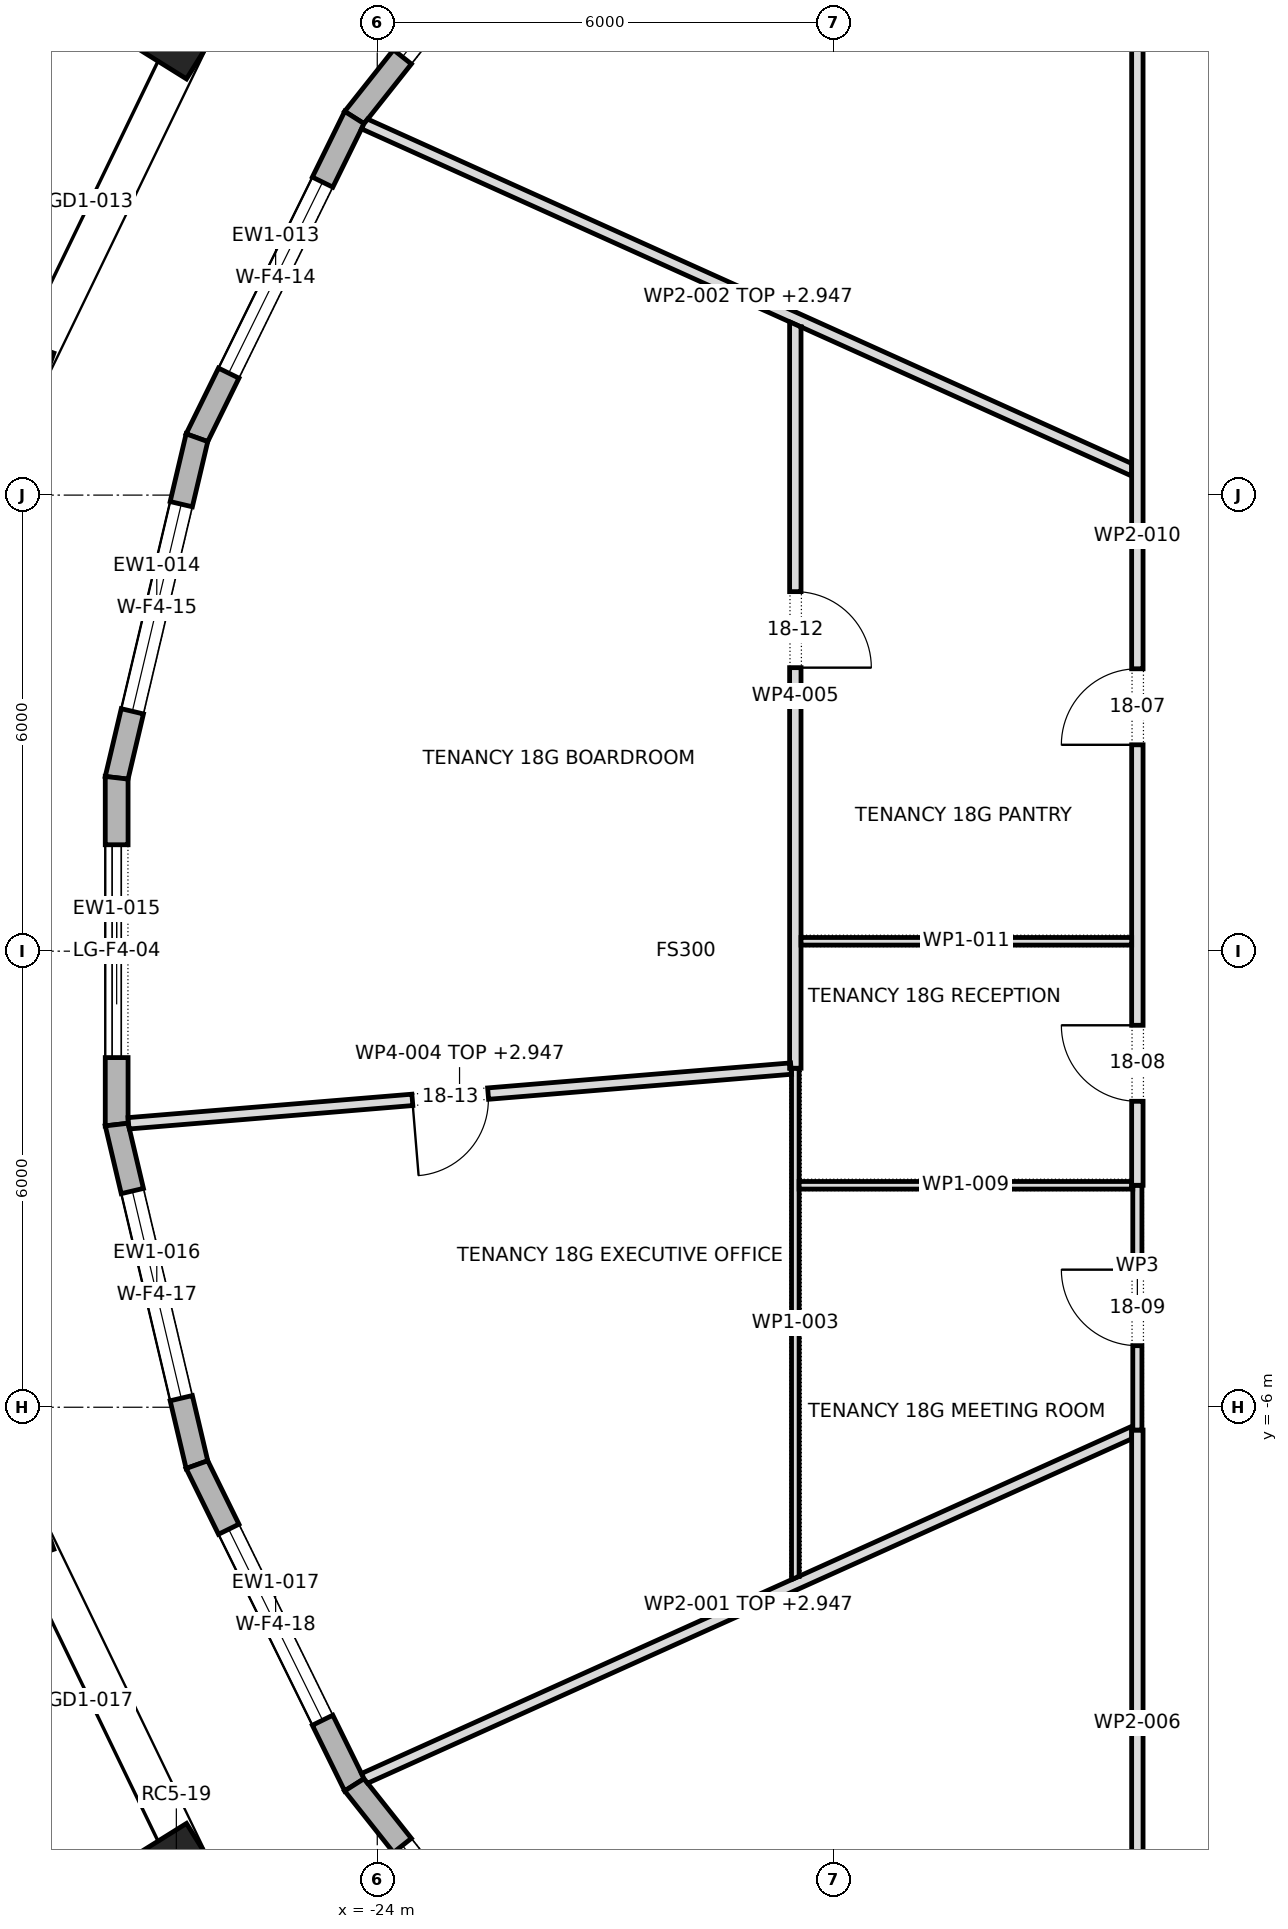
"""IFC4 building model, lengths in metres.
Left out: names, types, materials, properties, quantities, classifications, styles, units other than length and angle.
Written with IfcOpenShell. Run it as: python <this file> out.ifc"""

import sys

from ifc_helpers import new_model, si_unit, direction, frame, frame_2d, origin, origin_2d, place, context, subcontext, project, spatial, polyline, rectangle, outline, extrude, element, fill, save


model = new_model("IFC4")
c1 = context("Model", 3, precision=1e-05, world=origin(), true_north=direction((0.0, 1.0)))
c2 = subcontext(c1, "Body", "Model", "MODEL_VIEW")
j1 = project(units=[si_unit("LENGTHUNIT", "METRE"), si_unit("PLANEANGLEUNIT", "RADIAN")], contexts=[c1])
p1 = place(None, origin())
s1 = spatial("IfcSite", under=j1, at=p1, CompositionType="ELEMENT")
p2 = place(p1, origin())
s2 = spatial("IfcBuilding", under=s1, at=p2, CompositionType="ELEMENT")
p3 = place(p2, frame((0.0, 0.0, 256.3)))
s3 = spatial("IfcBuildingStorey", under=s2, at=p3, CompositionType="ELEMENT", Elevation=256.3)
for number, where, z_axis, x_axis in (
    (1, (-26.643, 12.207, 0.0), (0.0, 0.0, 1.0), (-0.529, -0.849, 0.0)),
    (2, (-28.91, 7.517, 0.0), (0.0, 0.0, 1.0), (-0.334, -0.943, 0.0)),
    (3, (-28.91, -7.517, 0.0), (0.0, 0.0, 1.0), (0.334, -0.943, 0.0)),
    (4, (-26.643, -12.207, 0.0), (0.0, 0.0, 1.0), (0.529, -0.849, 0.0)),
):
    element("IfcColumn", number, at=place(p3, frame(where, z_axis=z_axis, x_axis=x_axis)), inside=s3, PredefinedType="COLUMN", context=c2, shape_type="SweptSolid", body=[
        extrude(rectangle(XDim=1.1, YDim=1.0, at=origin_2d()), origin(), (0.0, 0.0, 1.0), 4.0),
    ])
p4 = place(p3, frame((-21.297, 14.756, 0.0), z_axis=(0.0, 0.0, 1.0), x_axis=(-0.621358373565, -0.783526497063, 0.0)))
e5 = element("IfcWall", 5, at=p4, inside=s3, PredefinedType="STANDARD", context=c2, shape_type="SweptSolid", body=[
    extrude(outline(polyline([(-0.015, -0.15), (4.852, -0.15), (4.82, 0.15), (0.015, 0.15), (-0.015, -0.15)])), origin(), (0.0, 0.0, 1.0), 3.7),
])
p5 = place(p4, frame((1.018, 0.0, 0.6)))
e6 = element("IfcOpeningElement", 6, at=p5, cuts=e5, PredefinedType="OPENING", context=c2, shape_type="SweptSolid", body=[
    extrude(rectangle(XDim=2.8, YDim=2.65, at=frame_2d((1.4, 1.325))), frame((0.0, 0.162, 0.0), z_axis=(0.0, -1.0, 0.0), x_axis=(1.0, 0.0, 0.0)), (0.0, 0.0, 1.0), 0.324),
])
p6 = place(p3, frame((-24.302, 10.967, 0.0), z_axis=(0.0, 0.0, 1.0), x_axis=(-0.441169971308, -0.89742356578, 0.0)))
e7 = element("IfcWall", 7, at=p6, inside=s3, PredefinedType="STANDARD", context=c2, shape_type="SweptSolid", body=[
    extrude(outline(polyline([(-0.016, -0.15), (4.711, -0.15), (4.677, 0.15), (0.016, 0.15), (-0.016, -0.15)])), origin(), (0.0, 0.0, 1.0), 3.7),
])
p7 = place(p6, frame((0.947, 0.0, 0.6)))
e8 = element("IfcOpeningElement", 8, at=p7, cuts=e7, PredefinedType="OPENING", context=c2, shape_type="SweptSolid", body=[
    extrude(rectangle(XDim=2.8, YDim=2.65, at=frame_2d((1.4, 1.325))), frame((0.0, 0.162, 0.0), z_axis=(0.0, -1.0, 0.0), x_axis=(1.0, 0.0, 0.0)), (0.0, 0.0, 1.0), 0.324),
])
p8 = place(p3, frame((-26.372, 6.755, 0.0), z_axis=(0.0, 0.0, 1.0), x_axis=(-0.229767529411, -0.973245540667, 0.0)))
e9 = element("IfcWall", 9, at=p8, inside=s3, PredefinedType="STANDARD", context=c2, shape_type="SweptSolid", body=[
    extrude(outline(polyline([(-0.017, -0.15), (4.614, -0.15), (4.579, 0.15), (0.017, 0.15), (-0.017, -0.15)])), origin(), (0.0, 0.0, 1.0), 3.7),
])
p9 = place(p8, frame((0.898, 0.0, 0.6)))
e10 = element("IfcOpeningElement", 10, at=p9, cuts=e9, PredefinedType="OPENING", context=c2, shape_type="SweptSolid", body=[
    extrude(rectangle(XDim=2.8, YDim=2.65, at=frame_2d((1.4, 1.325))), frame((0.0, 0.162, 0.0), z_axis=(0.0, -1.0, 0.0), x_axis=(1.0, 0.0, 0.0)), (0.0, 0.0, 1.0), 0.324),
])
p10 = place(p3, frame((-27.428, 2.281, 0.0), z_axis=(0.0, 0.0, 1.0), x_axis=(0.0, -1.0, 0.0)))
e11 = element("IfcWall", 11, at=p10, inside=s3, PredefinedType="STANDARD", context=c2, shape_type="SweptSolid", body=[
    extrude(outline(polyline([(-0.018, -0.15), (4.58, -0.15), (4.545, 0.15), (0.018, 0.15), (-0.018, -0.15)])), origin(), (0.0, 0.0, 1.0), 3.7),
])
p11 = place(p10, frame((0.881, 0.0, 0.0)))
e12 = element("IfcOpeningElement", 12, at=p11, cuts=e11, PredefinedType="OPENING", context=c2, shape_type="SweptSolid", body=[
    extrude(rectangle(XDim=2.8, YDim=3.25, at=frame_2d((1.4, 1.625))), frame((0.0, 0.162, 0.0), z_axis=(0.0, -1.0, 0.0), x_axis=(1.0, 0.0, 0.0)), (0.0, 0.0, 1.0), 0.324),
])
p12 = place(p3, frame((-27.428, -2.281, 0.0), z_axis=(0.0, 0.0, 1.0), x_axis=(0.229767529411, -0.973245540667, 0.0)))
e13 = element("IfcWall", 13, at=p12, inside=s3, PredefinedType="STANDARD", context=c2, shape_type="SweptSolid", body=[
    extrude(outline(polyline([(-0.018, -0.15), (4.614, -0.15), (4.58, 0.15), (0.018, 0.15), (-0.018, -0.15)])), origin(), (0.0, 0.0, 1.0), 3.7),
])
p13 = place(p12, frame((0.898, 0.0, 0.6)))
e14 = element("IfcOpeningElement", 14, at=p13, cuts=e13, PredefinedType="OPENING", context=c2, shape_type="SweptSolid", body=[
    extrude(rectangle(XDim=2.8, YDim=2.65, at=frame_2d((1.4, 1.325))), frame((0.0, 0.162, 0.0), z_axis=(0.0, -1.0, 0.0), x_axis=(1.0, 0.0, 0.0)), (0.0, 0.0, 1.0), 0.324),
])
p14 = place(p3, frame((-26.372, -6.755, 0.0), z_axis=(0.0, 0.0, 1.0), x_axis=(0.441169971308, -0.89742356578, 0.0)))
e15 = element("IfcWall", 15, at=p14, inside=s3, PredefinedType="STANDARD", context=c2, shape_type="SweptSolid", body=[
    extrude(outline(polyline([(-0.017, -0.15), (4.71, -0.15), (4.678, 0.15), (0.017, 0.15), (-0.017, -0.15)])), origin(), (0.0, 0.0, 1.0), 3.7),
])
p15 = place(p14, frame((0.947, 0.0, 0.6)))
e16 = element("IfcOpeningElement", 16, at=p15, cuts=e15, PredefinedType="OPENING", context=c2, shape_type="SweptSolid", body=[
    extrude(rectangle(XDim=2.8, YDim=2.65, at=frame_2d((1.4, 1.325))), frame((0.0, 0.162, 0.0), z_axis=(0.0, -1.0, 0.0), x_axis=(1.0, 0.0, 0.0)), (0.0, 0.0, 1.0), 0.324),
])
p16 = place(p3, frame((-24.302, -10.967, 0.0), z_axis=(0.0, 0.0, 1.0), x_axis=(0.621358373565, -0.783526497063, 0.0)))
e17 = element("IfcWall", 17, at=p16, inside=s3, PredefinedType="STANDARD", context=c2, shape_type="SweptSolid", body=[
    extrude(outline(polyline([(-0.016, -0.15), (4.851, -0.15), (4.821, 0.15), (0.016, 0.15), (-0.016, -0.15)])), origin(), (0.0, 0.0, 1.0), 3.7),
])
p17 = place(p16, frame((1.018, 0.0, 0.6)))
e18 = element("IfcOpeningElement", 18, at=p17, cuts=e17, PredefinedType="OPENING", context=c2, shape_type="SweptSolid", body=[
    extrude(rectangle(XDim=2.8, YDim=2.65, at=frame_2d((1.4, 1.325))), frame((0.0, 0.162, 0.0), z_axis=(0.0, -1.0, 0.0), x_axis=(1.0, 0.0, 0.0)), (0.0, 0.0, 1.0), 0.324),
])
p18 = place(p3, frame((-24.176, -10.887, 0.0), z_axis=(0.0, 0.0, 1.0), x_axis=(0.9116787738, 0.410903654648, 0.0)))
e19 = element("IfcWall", 19, at=p18, inside=s3, PredefinedType="PARTITIONING", context=c2, shape_type="SweptSolid", body=[
    extrude(outline(polyline([(0.021, -0.075), (1.858, -0.075), (3.696, -0.075), (5.533, -0.075), (7.371, -0.075), (9.208, -0.075), (11.046, -0.075), (11.094, 0.031), (11.107, 0.025), (11.13, 0.074), (11.13, 0.075), (9.525, 0.075), (7.92, 0.075), (6.315, 0.075), (6.314, 0.074), (6.312, 0.075), (4.734, 0.075), (3.156, 0.075), (1.578, 0.075), (0.0, 0.075), (0.0, 0.062), (0.002, -0.001), (0.021, -0.075)])), origin(), (0.0, 0.0, 1.0), 2.947),
])
p19 = place(p3, frame((-24.176, 10.887, 0.0), z_axis=(0.0, 0.0, 1.0), x_axis=(0.911671004153, -0.410920892857, 0.0)))
e20 = element("IfcWall", 20, at=p19, inside=s3, PredefinedType="PARTITIONING", context=c2, shape_type="SweptSolid", body=[
    extrude(outline(polyline([(0.0, -0.075), (1.584, -0.075), (3.168, -0.075), (4.752, -0.075), (6.335, -0.075), (6.341, -0.073), (6.342, -0.075), (7.933, -0.075), (9.523, -0.075), (11.113, -0.075), (11.113, -0.074), (11.097, -0.038), (11.097, -0.038), (11.046, 0.075), (9.208, 0.075), (7.371, 0.075), (5.533, 0.075), (3.696, 0.075), (1.858, 0.075), (0.021, 0.075), (0.002, 0.001), (0.0, -0.062), (0.0, -0.075)])), origin(), (0.0, 0.0, 1.0), 2.947),
])
p20 = place(p3, frame((-18.5, -8.268, 0.0), z_axis=(0.0, 0.0, 1.0), x_axis=(0.0, 1.0, 0.0)))
e21 = element("IfcWall", 21, at=p20, inside=s3, PredefinedType="PARTITIONING", context=c2, shape_type="SweptSolid", body=[
    extrude(outline(polyline([(0.045, -0.05), (1.742, -0.05), (3.44, -0.05), (5.138, -0.05), (5.138, -0.05), (5.238, -0.05), (5.238, -0.05), (6.728, -0.05), (6.728, 0.05), (5.046, 0.05), (3.364, 0.05), (1.682, 0.05), (0.0, 0.05), (0.0, 0.049), (0.045, -0.05)])), origin(), (0.0, 0.0, 1.0), 3.7),
])
p21 = place(p3, frame((-18.556, -1.545, 0.0), z_axis=(0.0, 0.0, 1.0), x_axis=(-0.996605565352, -0.0823246446, 0.0)))
e22 = element("IfcWall", 22, at=p21, inside=s3, PredefinedType="PARTITIONING", context=c2, shape_type="SweptSolid", body=[
    extrude(outline(polyline([(8.746, -0.075), (8.746, 0.039), (8.74, 0.075), (6.992, 0.075), (5.244, 0.075), (3.496, 0.075), (1.748, 0.075), (0.0, 0.075), (0.0, -0.005), (0.018, -0.006), (0.012, -0.075), (1.759, -0.075), (3.506, -0.075), (5.252, -0.075), (6.999, -0.075), (8.746, -0.075)])), origin(), (0.0, 0.0, 1.0), 2.947),
])
p22 = place(p21, frame((3.999, 0.0, 0.0)))
e23 = element("IfcOpeningElement", 23, at=p22, cuts=e22, PredefinedType="OPENING", context=c2, shape_type="SweptSolid", body=[
    extrude(rectangle(XDim=1.0, YDim=2.1, at=frame_2d((0.5, 1.05))), frame((0.0, 0.087, 0.0), z_axis=(0.0, -1.0, 0.0), x_axis=(1.0, 0.0, 0.0)), (0.0, 0.0, 1.0), 0.174),
])
p23 = place(p3, frame((-18.5, -1.54, 0.0), z_axis=(0.0, 0.0, 1.0), x_axis=(0.0, 1.0, 0.0)))
e24 = element("IfcWall", 24, at=p23, inside=s3, PredefinedType="PARTITIONING", context=c2, shape_type="SweptSolid", body=[
    extrude(outline(polyline([(0.0, -0.075), (1.95, -0.075), (3.901, -0.075), (5.851, -0.075), (7.802, -0.075), (9.752, -0.075), (9.82, 0.074), (9.82, 0.075), (7.869, 0.075), (5.919, 0.075), (3.969, 0.075), (2.019, 0.075), (0.069, 0.075), (0.07, 0.062), (0.0, 0.057), (0.0, 0.05), (0.0, 0.05), (0.0, -0.05), (0.0, -0.05), (0.0, -0.075)])), origin(), (0.0, 0.0, 1.0), 3.7),
])
p24 = place(p23, frame((5.27, 0.0, 0.0)))
e25 = element("IfcOpeningElement", 25, at=p24, cuts=e24, PredefinedType="OPENING", context=c2, shape_type="SweptSolid", body=[
    extrude(rectangle(XDim=1.0, YDim=2.1, at=frame_2d((0.5, 1.05))), frame((0.0, 0.087, 0.0), z_axis=(0.0, -1.0, 0.0), x_axis=(1.0, 0.0, 0.0)), (0.0, 0.0, 1.0), 0.174),
])
p25 = place(p3, frame((-14.0, -14.075, 0.0), z_axis=(0.0, 0.0, 1.0), x_axis=(0.0, 1.0, 0.0)))
e26 = element("IfcWall", 26, at=p25, inside=s3, PredefinedType="PARTITIONING", context=c2, shape_type="SweptSolid", body=[
    extrude(outline(polyline([(7.775, 0.075), (5.831, 0.075), (3.887, 0.075), (1.944, 0.075), (0.0, 0.075), (0.15, -0.075), (2.056, -0.075), (3.962, -0.075), (5.869, -0.075), (7.775, -0.075), (7.775, 0.075)])), origin(), (0.0, 0.0, 1.0), 3.7),
])
p26 = place(p3, frame((-14.0, -6.3, 0.0), z_axis=(0.0, 0.0, 1.0), x_axis=(0.0, 1.0, 0.0)))
e27 = element("IfcWall", 27, at=p26, inside=s3, PredefinedType="PARTITIONING", context=c2, shape_type="SweptSolid", body=[
    extrude(rectangle(XDim=3.22, YDim=0.12, at=frame_2d((1.61, 0.0))), origin(), (0.0, 0.0, 1.0), 3.7),
])
p27 = place(p26, frame((1.11, 0.0, 0.0)))
e28 = element("IfcOpeningElement", 28, at=p27, cuts=e27, PredefinedType="OPENING", context=c2, shape_type="SweptSolid", body=[
    extrude(rectangle(XDim=1.0, YDim=2.1, at=frame_2d((0.5, 1.05))), frame((0.0, 0.072, 0.0), z_axis=(0.0, -1.0, 0.0), x_axis=(1.0, 0.0, 0.0)), (0.0, 0.0, 1.0), 0.144),
])
p28 = place(p3, frame((-14.061, -3.08, 0.0), z_axis=(0.0, 0.0, 1.0), x_axis=(-1.0, 0.0, 0.0)))
e29 = element("IfcWall", 29, at=p28, inside=s3, PredefinedType="PARTITIONING", context=c2, shape_type="SweptSolid", body=[
    extrude(outline(polyline([(0.0, 0.05), (0.0, 0.0), (0.014, 0.0), (0.014, -0.05), (1.473, -0.05), (2.931, -0.05), (4.389, -0.05), (4.389, 0.05), (2.926, 0.05), (1.463, 0.05), (0.0, 0.05)])), origin(), (0.0, 0.0, 1.0), 3.7),
])
p29 = place(p3, frame((-14.0, -3.08, 0.0), z_axis=(0.0, 0.0, 1.0), x_axis=(0.0, 1.0, 0.0)))
e30 = element("IfcWall", 30, at=p29, inside=s3, PredefinedType="PARTITIONING", context=c2, shape_type="SweptSolid", body=[
    extrude(outline(polyline([(0.0, -0.075), (1.889, -0.075), (3.779, -0.075), (5.668, -0.075), (7.558, -0.075), (9.447, -0.075), (11.337, -0.075), (13.226, -0.075), (15.116, -0.075), (17.005, -0.075), (17.155, 0.075), (15.249, 0.075), (13.343, 0.075), (11.437, 0.075), (9.531, 0.075), (7.625, 0.075), (5.718, 0.075), (3.812, 0.075), (1.906, 0.075), (0.0, 0.075), (0.0, -0.075)])), origin(), (0.0, 0.0, 1.0), 3.7),
])
p30 = place(p29, frame((5.795, 0.0, 0.0)))
e31 = element("IfcOpeningElement", 31, at=p30, cuts=e30, PredefinedType="OPENING", context=c2, shape_type="SweptSolid", body=[
    extrude(rectangle(XDim=1.0, YDim=2.1, at=frame_2d((0.5, 1.05))), frame((0.0, 0.087, 0.0), z_axis=(0.0, -1.0, 0.0), x_axis=(1.0, 0.0, 0.0)), (0.0, 0.0, 1.0), 0.174),
])
p31 = place(p29, frame((1.105, 0.0, 0.0)))
e32 = element("IfcOpeningElement", 32, at=p31, cuts=e30, PredefinedType="OPENING", context=c2, shape_type="SweptSolid", body=[
    extrude(rectangle(XDim=1.0, YDim=2.1, at=frame_2d((0.5, 1.05))), frame((0.0, 0.087, 0.0), z_axis=(0.0, -1.0, 0.0), x_axis=(1.0, 0.0, 0.0)), (0.0, 0.0, 1.0), 0.174),
])
p32 = place(p3, frame((-14.075, 0.13, 0.0), z_axis=(0.0, 0.0, 1.0), x_axis=(-1.0, 0.0, 0.0)))
e33 = element("IfcWall", 33, at=p32, inside=s3, PredefinedType="PARTITIONING", context=c2, shape_type="SweptSolid", body=[
    extrude(rectangle(XDim=4.35, YDim=0.1, at=frame_2d((2.175, 0.0))), origin(), (0.0, 0.0, 1.0), 3.7),
])
p33 = place(p5, origin())
e34 = element("IfcWindow", 34, at=p33, inside=s3, PartitioningType="DOUBLE_PANEL_VERTICAL", PredefinedType="WINDOW", context=c2, shape_type="SweptSolid", body=[
    extrude(rectangle(XDim=2.8, YDim=2.65, at=frame_2d((1.4, 1.325))), frame((0.0, 0.03, 0.0), z_axis=(0.0, -1.0, 0.0), x_axis=(1.0, 0.0, 0.0)), (0.0, 0.0, 1.0), 0.06),
])
fill(e6, e34)
p34 = place(p7, origin())
e35 = element("IfcWindow", 35, at=p34, inside=s3, PartitioningType="DOUBLE_PANEL_VERTICAL", PredefinedType="WINDOW", context=c2, shape_type="SweptSolid", body=[
    extrude(rectangle(XDim=2.8, YDim=2.65, at=frame_2d((1.4, 1.325))), frame((0.0, 0.03, 0.0), z_axis=(0.0, -1.0, 0.0), x_axis=(1.0, 0.0, 0.0)), (0.0, 0.0, 1.0), 0.06),
])
fill(e8, e35)
p35 = place(p9, origin())
e36 = element("IfcWindow", 36, at=p35, inside=s3, PartitioningType="DOUBLE_PANEL_VERTICAL", PredefinedType="WINDOW", context=c2, shape_type="SweptSolid", body=[
    extrude(rectangle(XDim=2.8, YDim=2.65, at=frame_2d((1.4, 1.325))), frame((0.0, 0.03, 0.0), z_axis=(0.0, -1.0, 0.0), x_axis=(1.0, 0.0, 0.0)), (0.0, 0.0, 1.0), 0.06),
])
fill(e10, e36)
p36 = place(p11, origin())
e37 = element("IfcDoor", 37, at=p36, inside=s3, OperationType="DOUBLE_DOOR_SLIDING", PredefinedType="DOOR", context=c2, shape_type="SweptSolid", body=[
    extrude(rectangle(XDim=2.8, YDim=3.25, at=frame_2d((1.4, 1.625))), frame((0.0, 0.025, 0.0), z_axis=(0.0, -1.0, 0.0), x_axis=(1.0, 0.0, 0.0)), (0.0, 0.0, 1.0), 0.05),
])
fill(e12, e37)
p37 = place(p13, origin())
e38 = element("IfcWindow", 38, at=p37, inside=s3, PartitioningType="DOUBLE_PANEL_VERTICAL", PredefinedType="WINDOW", context=c2, shape_type="SweptSolid", body=[
    extrude(rectangle(XDim=2.8, YDim=2.65, at=frame_2d((1.4, 1.325))), frame((0.0, 0.03, 0.0), z_axis=(0.0, -1.0, 0.0), x_axis=(1.0, 0.0, 0.0)), (0.0, 0.0, 1.0), 0.06),
])
fill(e14, e38)
p38 = place(p15, origin())
e39 = element("IfcWindow", 39, at=p38, inside=s3, PartitioningType="DOUBLE_PANEL_VERTICAL", PredefinedType="WINDOW", context=c2, shape_type="SweptSolid", body=[
    extrude(rectangle(XDim=2.8, YDim=2.65, at=frame_2d((1.4, 1.325))), frame((0.0, 0.03, 0.0), z_axis=(0.0, -1.0, 0.0), x_axis=(1.0, 0.0, 0.0)), (0.0, 0.0, 1.0), 0.06),
])
fill(e16, e39)
p39 = place(p17, origin())
e40 = element("IfcWindow", 40, at=p39, inside=s3, PartitioningType="DOUBLE_PANEL_VERTICAL", PredefinedType="WINDOW", context=c2, shape_type="SweptSolid", body=[
    extrude(rectangle(XDim=2.8, YDim=2.65, at=frame_2d((1.4, 1.325))), frame((0.0, 0.03, 0.0), z_axis=(0.0, -1.0, 0.0), x_axis=(1.0, 0.0, 0.0)), (0.0, 0.0, 1.0), 0.06),
])
fill(e18, e40)
p40 = place(p30, origin())
e41 = element("IfcDoor", 41, at=p40, inside=s3, OperationType="SINGLE_SWING_RIGHT", PredefinedType="DOOR", context=c2, shape_type="SweptSolid", body=[
    extrude(rectangle(XDim=1.0, YDim=2.1, at=frame_2d((0.5, 1.05))), frame((0.0, 0.025, 0.0), z_axis=(0.0, -1.0, 0.0), x_axis=(1.0, 0.0, 0.0)), (0.0, 0.0, 1.0), 0.05),
])
fill(e31, e41)
p41 = place(p31, origin())
e42 = element("IfcDoor", 42, at=p41, inside=s3, OperationType="SINGLE_SWING_LEFT", PredefinedType="DOOR", context=c2, shape_type="SweptSolid", body=[
    extrude(rectangle(XDim=1.0, YDim=2.1, at=frame_2d((0.5, 1.05))), frame((0.0, 0.025, 0.0), z_axis=(0.0, -1.0, 0.0), x_axis=(1.0, 0.0, 0.0)), (0.0, 0.0, 1.0), 0.05),
])
fill(e32, e42)
p42 = place(p27, origin())
e43 = element("IfcDoor", 43, at=p42, inside=s3, OperationType="SINGLE_SWING_LEFT", PredefinedType="DOOR", context=c2, shape_type="SweptSolid", body=[
    extrude(rectangle(XDim=1.0, YDim=2.1, at=frame_2d((0.5, 1.05))), frame((0.0, 0.025, 0.0), z_axis=(0.0, -1.0, 0.0), x_axis=(1.0, 0.0, 0.0)), (0.0, 0.0, 1.0), 0.05),
])
fill(e28, e43)
p43 = place(p24, frame((1.0, 0.0, 0.0), z_axis=(0.0, 0.0, 1.0), x_axis=(-1.0, 0.0, 0.0)))
e44 = element("IfcDoor", 44, at=p43, inside=s3, OperationType="SINGLE_SWING_LEFT", PredefinedType="DOOR", context=c2, shape_type="SweptSolid", body=[
    extrude(rectangle(XDim=1.0, YDim=2.1, at=frame_2d((0.5, 1.05))), frame((0.0, 0.025, 0.0), z_axis=(0.0, -1.0, 0.0), x_axis=(1.0, 0.0, 0.0)), (0.0, 0.0, 1.0), 0.05),
])
fill(e25, e44)
p44 = place(p22, origin())
e45 = element("IfcDoor", 45, at=p44, inside=s3, OperationType="SINGLE_SWING_LEFT", PredefinedType="DOOR", context=c2, shape_type="SweptSolid", body=[
    extrude(rectangle(XDim=1.0, YDim=2.1, at=frame_2d((0.5, 1.05))), frame((0.0, 0.025, 0.0), z_axis=(0.0, -1.0, 0.0), x_axis=(1.0, 0.0, 0.0)), (0.0, 0.0, 1.0), 0.05),
])
fill(e23, e45)
save(model, sys.argv[1])
